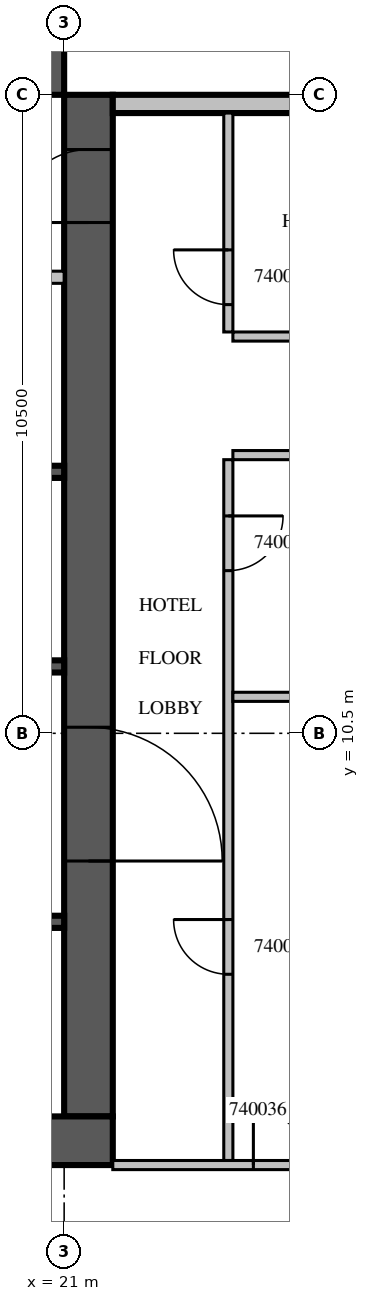
"""IFC4 building model, lengths in metres.
Left out: names, types, materials, properties, quantities, classifications, styles, units other than length and angle.
Written with IfcOpenShell. Run it as: python <this file> out.ifc"""

import sys

from ifc_helpers import new_model, si_unit, direction, frame, frame_2d, origin, place, context, subcontext, project, spatial, rectangle, extrude, source, transform, mapped, element, fill, save


model = new_model("IFC4")
c1 = context("Model", 3, precision=1e-05, world=origin(), true_north=direction((0.0, 1.0)))
c2 = subcontext(c1, "Body", "Model", "MODEL_VIEW")
j1 = project(units=[si_unit("LENGTHUNIT", "METRE"), si_unit("PLANEANGLEUNIT", "RADIAN")], contexts=[c1])
p1 = place(None, origin())
s1 = spatial("IfcSite", under=j1, at=p1, CompositionType="ELEMENT")
p2 = place(p1, origin())
s2 = spatial("IfcBuilding", under=s1, at=p2, CompositionType="ELEMENT")
p3 = place(p2, frame((0.0, 0.0, 185.4)))
s3 = spatial("IfcBuildingStorey", under=s2, at=p3, CompositionType="ELEMENT", Elevation=185.4)
m1 = source(origin(), c2, "Body", "SweptSolid", [
    extrude(rectangle(XDim=16.8, YDim=0.8, at=frame_2d((8.4, 0.0))), origin(), (0.0, 0.0, 1.0), 3.8),
])
p4 = place(p3, frame((21.4, 4.2, 0.0), z_axis=(0.0, 0.0, 1.0), x_axis=(0.0, 1.0, 0.0)))
e1 = element("IfcWall", 1, at=p4, inside=s3, PredefinedType="SHEAR", context=c2, shape_type="MappedRepresentation", body=[
    mapped(m1, transform((0.0, 0.0, 0.0), scale=1.0)),
])
m2 = source(origin(), c2, "Body", "SweptSolid", [
    extrude(rectangle(XDim=2.2, YDim=2.1, at=frame_2d((1.1, 1.05))), frame((0.0, 0.41, 0.0), z_axis=(0.0, -1.0, 0.0), x_axis=(1.0, 0.0, 0.0)), (0.0, 0.0, 1.0), 0.82),
])
p5 = place(p4, frame((4.2, 0.0, 0.0)))
e2 = element("IfcOpeningElement", 2, at=p5, cuts=e1, PredefinedType="OPENING", context=c2, shape_type="MappedRepresentation", body=[
    mapped(m2, transform((0.0, 0.0, 0.0), scale=1.0)),
])
m3 = source(origin(), c2, "Body", "SweptSolid", [
    extrude(rectangle(XDim=1.2, YDim=2.1, at=frame_2d((0.6, 1.05))), frame((0.0, 0.41, 0.0), z_axis=(0.0, -1.0, 0.0), x_axis=(1.0, 0.0, 0.0)), (0.0, 0.0, 1.0), 0.82),
])
p6 = place(p4, frame((14.7, 0.0, 0.0)))
e3 = element("IfcOpeningElement", 3, at=p6, cuts=e1, PredefinedType="OPENING", context=c2, shape_type="MappedRepresentation", body=[
    mapped(m3, transform((0.0, 0.0, 0.0), scale=1.0)),
])
m4 = source(origin(), c2, "Body", "SweptSolid", [
    extrude(rectangle(XDim=17.6, YDim=0.8, at=frame_2d((8.8, 0.0))), origin(), (0.0, 0.0, 1.0), 3.8),
])
p7 = place(p3, frame((4.2, 3.8, 0.0), z_axis=(0.0, 0.0, 1.0), x_axis=(1.0, 0.0, 0.0)))
e4 = element("IfcWall", 4, at=p7, inside=s3, PredefinedType="SHEAR", context=c2, shape_type="MappedRepresentation", body=[
    mapped(m4, transform((0.0, 0.0, 0.0), scale=1.0)),
])
m5 = source(origin(), c2, "Body", "SweptSolid", [
    extrude(rectangle(XDim=0.9, YDim=2.1, at=frame_2d((0.45, 1.05))), frame((0.0, 0.41, 0.0), z_axis=(0.0, -1.0, 0.0), x_axis=(1.0, 0.0, 0.0)), (0.0, 0.0, 1.0), 0.82),
])
p8 = place(p7, frame((11.55, 0.0, 0.0)))
e5 = element("IfcOpeningElement", 5, at=p8, cuts=e4, PredefinedType="OPENING", context=c2, shape_type="MappedRepresentation", body=[
    mapped(m5, transform((0.0, 0.0, 0.0), scale=1.0)),
])
p9 = place(p3, frame((4.2, 21.4, 0.0), z_axis=(0.0, 0.0, 1.0), x_axis=(1.0, 0.0, 0.0)))
e6 = element("IfcWall", 6, at=p9, inside=s3, PredefinedType="SHEAR", context=c2, shape_type="MappedRepresentation", body=[
    mapped(m1, transform((0.0, 0.0, 0.0), scale=1.0)),
])
p10 = place(p9, frame((7.4, 0.0, 0.0)))
e7 = element("IfcOpeningElement", 7, at=p10, cuts=e6, PredefinedType="OPENING", context=c2, shape_type="MappedRepresentation", body=[
    mapped(m3, transform((0.0, 0.0, 0.0), scale=1.0)),
])
m6 = source(origin(), c2, "Body", "SweptSolid", [
    extrude(rectangle(XDim=7.15, YDim=0.3, at=frame_2d((3.575, 0.0))), origin(), (0.0, 0.0, 1.0), 3.4),
])
p11 = place(p3, frame((28.95, 20.85, 0.0), z_axis=(0.0, 0.0, 1.0), x_axis=(-1.0, 0.0, 0.0)))
e8 = element("IfcWall", 8, at=p11, inside=s3, PredefinedType="STANDARD", context=c2, shape_type="MappedRepresentation", body=[
    mapped(m6, transform((0.0, 0.0, 0.0), scale=1.0)),
])
m7 = source(origin(), c2, "Body", "SweptSolid", [
    extrude(rectangle(XDim=3.0, YDim=2.3, at=frame_2d((1.5, 1.15))), frame((0.0, 0.16, 0.0), z_axis=(0.0, -1.0, 0.0), x_axis=(1.0, 0.0, 0.0)), (0.0, 0.0, 1.0), 0.32),
])
p12 = place(p11, frame((0.15, 0.0, 0.6)))
e9 = element("IfcOpeningElement", 9, at=p12, cuts=e8, PredefinedType="OPENING", context=c2, shape_type="MappedRepresentation", body=[
    mapped(m7, transform((0.0, 0.0, 0.0), scale=1.0)),
])
m8 = source(origin(), c2, "Body", "SweptSolid", [
    extrude(rectangle(XDim=2.4, YDim=0.2, at=frame_2d((1.2, 0.0))), origin(), (0.0, 0.0, 1.0), 3.8),
])
p13 = place(p3, frame((18.6, 7.4, 0.0), z_axis=(0.0, 0.0, 1.0), x_axis=(1.0, 0.0, 0.0)))
e10 = element("IfcWall", 10, at=p13, inside=s3, PredefinedType="SOLIDWALL", context=c2, shape_type="MappedRepresentation", body=[
    mapped(m8, transform((0.0, 0.0, 0.0), scale=1.0)),
])
m9 = source(origin(), c2, "Body", "SweptSolid", [
    extrude(rectangle(XDim=9.6, YDim=0.2, at=frame_2d((4.8, 0.0))), origin(), (0.0, 0.0, 1.0), 3.8),
])
p14 = place(p3, frame((11.4, 11.6, 0.0), z_axis=(0.0, 0.0, 1.0), x_axis=(1.0, 0.0, 0.0)))
e11 = element("IfcWall", 11, at=p14, inside=s3, PredefinedType="SOLIDWALL", context=c2, shape_type="MappedRepresentation", body=[
    mapped(m9, transform((0.0, 0.0, 0.0), scale=1.0)),
])
p15 = place(p3, frame((11.4, 14.8, 0.0), z_axis=(0.0, 0.0, 1.0), x_axis=(1.0, 0.0, 0.0)))
e12 = element("IfcWall", 12, at=p15, inside=s3, PredefinedType="SOLIDWALL", context=c2, shape_type="MappedRepresentation", body=[
    mapped(m9, transform((0.0, 0.0, 0.0), scale=1.0)),
])
m10 = source(origin(), c2, "Body", "SweptSolid", [
    extrude(rectangle(XDim=1.1, YDim=2.1, at=frame_2d((0.55, 1.05))), frame((0.0, 0.11, 0.0), z_axis=(0.0, -1.0, 0.0), x_axis=(1.0, 0.0, 0.0)), (0.0, 0.0, 1.0), 0.22),
])
p16 = place(p15, frame((3.05, 0.0, 0.0)))
e13 = element("IfcOpeningElement", 13, at=p16, cuts=e12, PredefinedType="OPENING", context=c2, shape_type="MappedRepresentation", body=[
    mapped(m10, transform((0.0, 0.0, 0.0), scale=1.0)),
])
p17 = place(p15, frame((5.45, 0.0, 0.0)))
e14 = element("IfcOpeningElement", 14, at=p17, cuts=e12, PredefinedType="OPENING", context=c2, shape_type="MappedRepresentation", body=[
    mapped(m10, transform((0.0, 0.0, 0.0), scale=1.0)),
])
p18 = place(p15, frame((7.85, 0.0, 0.0)))
e15 = element("IfcOpeningElement", 15, at=p18, cuts=e12, PredefinedType="OPENING", context=c2, shape_type="MappedRepresentation", body=[
    mapped(m10, transform((0.0, 0.0, 0.0), scale=1.0)),
])
m11 = source(origin(), c2, "Body", "SweptSolid", [
    extrude(rectangle(XDim=11.45, YDim=0.2, at=frame_2d((5.725, 0.0))), origin(), (0.0, 0.0, 1.0), 3.4),
])
p19 = place(p3, frame((9.55, 18.0, 0.0), z_axis=(0.0, 0.0, 1.0), x_axis=(1.0, 0.0, 0.0)))
e16 = element("IfcWall", 16, at=p19, inside=s3, PredefinedType="PARTITIONING", context=c2, shape_type="MappedRepresentation", body=[
    mapped(m11, transform((0.0, 0.0, 0.0), scale=1.0)),
])
m12 = source(origin(), c2, "Body", "SweptSolid", [
    extrude(rectangle(XDim=0.9, YDim=2.1, at=frame_2d((0.45, 1.05))), frame((0.0, 0.11, 0.0), z_axis=(0.0, -1.0, 0.0), x_axis=(1.0, 0.0, 0.0)), (0.0, 0.0, 1.0), 0.22),
])
p20 = place(p19, frame((1.075, 0.0, 0.0)))
e17 = element("IfcOpeningElement", 17, at=p20, cuts=e16, PredefinedType="OPENING", context=c2, shape_type="MappedRepresentation", body=[
    mapped(m12, transform((0.0, 0.0, 0.0), scale=1.0)),
])
p21 = place(p19, frame((3.125, 0.0, 0.0)))
e18 = element("IfcOpeningElement", 18, at=p21, cuts=e16, PredefinedType="OPENING", context=c2, shape_type="MappedRepresentation", body=[
    mapped(m12, transform((0.0, 0.0, 0.0), scale=1.0)),
])
p22 = place(p19, frame((7.35, 0.0, 0.0)))
e19 = element("IfcOpeningElement", 19, at=p22, cuts=e16, PredefinedType="OPENING", context=c2, shape_type="MappedRepresentation", body=[
    mapped(m10, transform((0.0, 0.0, 0.0), scale=1.0)),
])
m13 = source(origin(), c2, "Body", "SweptSolid", [
    extrude(rectangle(XDim=11.525, YDim=0.15, at=frame_2d((5.763, 0.0))), origin(), (0.0, 0.0, 1.0), 3.4),
])
p23 = place(p3, frame((23.7, 15.0, 0.0), z_axis=(0.0, 0.0, 1.0), x_axis=(0.0, -1.0, 0.0)))
e20 = element("IfcWall", 20, at=p23, inside=s3, PredefinedType="PARTITIONING", context=c2, shape_type="MappedRepresentation", body=[
    mapped(m13, transform((0.0, 0.0, 0.0), scale=1.0)),
])
m14 = source(origin(), c2, "Body", "SweptSolid", [
    extrude(rectangle(XDim=0.9, YDim=2.1, at=frame_2d((0.45, 1.05))), frame((0.0, 0.085, 0.0), z_axis=(0.0, -1.0, 0.0), x_axis=(1.0, 0.0, 0.0)), (0.0, 0.0, 1.0), 0.17),
])
p24 = place(p23, frame((7.562, 0.0, 0.0)))
e21 = element("IfcOpeningElement", 21, at=p24, cuts=e20, PredefinedType="OPENING", context=c2, shape_type="MappedRepresentation", body=[
    mapped(m14, transform((0.0, 0.0, 0.0), scale=1.0)),
])
p25 = place(p23, frame((0.925, 0.0, 0.0)))
e22 = element("IfcOpeningElement", 22, at=p25, cuts=e20, PredefinedType="OPENING", context=c2, shape_type="MappedRepresentation", body=[
    mapped(m14, transform((0.0, 0.0, 0.0), scale=1.0)),
])
m15 = source(origin(), c2, "Body", "SweptSolid", [
    extrude(rectangle(XDim=3.6, YDim=0.15, at=frame_2d((1.8, 0.0))), origin(), (0.0, 0.0, 1.0), 3.4),
])
p26 = place(p3, frame((23.7, 20.7, 0.0), z_axis=(0.0, 0.0, 1.0), x_axis=(0.0, -1.0, 0.0)))
e23 = element("IfcWall", 23, at=p26, inside=s3, PredefinedType="PARTITIONING", context=c2, shape_type="MappedRepresentation", body=[
    mapped(m15, transform((0.0, 0.0, 0.0), scale=1.0)),
])
p27 = place(p26, frame((2.25, 0.0, 0.0)))
e24 = element("IfcOpeningElement", 24, at=p27, cuts=e23, PredefinedType="OPENING", context=c2, shape_type="MappedRepresentation", body=[
    mapped(m14, transform((0.0, 0.0, 0.0), scale=1.0)),
])
m16 = source(origin(), c2, "Body", "SweptSolid", [
    extrude(rectangle(XDim=5.55, YDim=0.15, at=frame_2d((2.775, 0.0))), origin(), (0.0, 0.0, 1.0), 3.4),
])
for number, where, z_axis, x_axis in (
    (25, (29.325, 11.1, 0.0), (0.0, 0.0, 1.0), (-1.0, 0.0, 0.0)),
    (26, (29.325, 15.075, 0.0), (0.0, 0.0, 1.0), (-1.0, 0.0, 0.0)),
    (27, (23.775, 17.025, 0.0), (0.0, 0.0, 1.0), (1.0, 0.0, 0.0)),
):
    element("IfcWall", number, at=place(p3, frame(where, z_axis=z_axis, x_axis=x_axis)), inside=s3, PredefinedType="PARTITIONING", context=c2, shape_type="MappedRepresentation", body=[
        mapped(m16, transform((0.0, 0.0, 0.0), scale=1.0)),
    ])
m17 = source(origin(), c2, "Body", "SweptSolid", [
    extrude(rectangle(XDim=7.525, YDim=0.15, at=frame_2d((3.763, 0.0))), origin(), (0.0, 0.0, 1.0), 3.4),
])
p28 = place(p3, frame((21.8, 3.4, 0.0), z_axis=(0.0, 0.0, 1.0), x_axis=(1.0, 0.0, 0.0)))
e28 = element("IfcWall", 28, at=p28, inside=s3, PredefinedType="PARTITIONING", context=c2, shape_type="MappedRepresentation", body=[
    mapped(m17, transform((0.0, 0.0, 0.0), scale=1.0)),
])
m18 = source(origin(), c2, "Body", "SweptSolid", [
    extrude(rectangle(XDim=1.0, YDim=2.1, at=frame_2d((0.5, 1.05))), frame((0.0, 0.085, 0.0), z_axis=(0.0, -1.0, 0.0), x_axis=(1.0, 0.0, 0.0)), (0.0, 0.0, 1.0), 0.17),
])
p29 = place(p28, frame((3.3, 0.0, 0.0)))
e29 = element("IfcOpeningElement", 29, at=p29, cuts=e28, PredefinedType="OPENING", context=c2, shape_type="MappedRepresentation", body=[
    mapped(m18, transform((0.0, 0.0, 0.0), scale=1.0)),
])
p30 = place(p28, frame((2.312, 0.0, 0.0)))
e30 = element("IfcOpeningElement", 30, at=p30, cuts=e28, PredefinedType="OPENING", context=c2, shape_type="MappedRepresentation", body=[
    mapped(m14, transform((0.0, 0.0, 0.0), scale=1.0)),
])
m19 = source(origin(), c2, "Body", "SweptSolid", [
    extrude(rectangle(XDim=2.2, YDim=2.1, at=frame_2d((1.1, 1.05))), frame((0.0, 0.025, 0.0), z_axis=(0.0, -1.0, 0.0), x_axis=(1.0, 0.0, 0.0)), (0.0, 0.0, 1.0), 0.05),
])
p31 = place(p5, origin())
e31 = element("IfcDoor", 31, at=p31, inside=s3, OperationType="DOUBLE_DOOR_SINGLE_SWING", PredefinedType="DOOR", context=c2, shape_type="MappedRepresentation", body=[
    mapped(m19, transform((0.0, 0.0, 0.0), scale=1.0)),
])
fill(e2, e31)
m20 = source(origin(), c2, "Body", "SweptSolid", [
    extrude(rectangle(XDim=1.2, YDim=2.1, at=frame_2d((0.6, 1.05))), frame((0.0, 0.025, 0.0), z_axis=(0.0, -1.0, 0.0), x_axis=(1.0, 0.0, 0.0)), (0.0, 0.0, 1.0), 0.05),
])
p32 = place(p6, origin())
e32 = element("IfcDoor", 32, at=p32, inside=s3, OperationType="SINGLE_SWING_LEFT", PredefinedType="DOOR", context=c2, shape_type="MappedRepresentation", body=[
    mapped(m20, transform((0.0, 0.0, 0.0), scale=1.0)),
])
fill(e3, e32)
m21 = source(origin(), c2, "Body", "SweptSolid", [
    extrude(rectangle(XDim=0.9, YDim=2.1, at=frame_2d((0.45, 1.05))), frame((0.0, 0.025, 0.0), z_axis=(0.0, -1.0, 0.0), x_axis=(1.0, 0.0, 0.0)), (0.0, 0.0, 1.0), 0.05),
])
p33 = place(p24, origin())
e33 = element("IfcDoor", 33, at=p33, inside=s3, OperationType="SINGLE_SWING_RIGHT", PredefinedType="DOOR", context=c2, shape_type="MappedRepresentation", body=[
    mapped(m21, transform((0.0, 0.0, 0.0), scale=1.0)),
])
fill(e21, e33)
p34 = place(p25, origin())
e34 = element("IfcDoor", 34, at=p34, inside=s3, OperationType="SINGLE_SWING_LEFT", PredefinedType="DOOR", context=c2, shape_type="MappedRepresentation", body=[
    mapped(m21, transform((0.0, 0.0, 0.0), scale=1.0)),
])
fill(e22, e34)
p35 = place(p27, origin())
e35 = element("IfcDoor", 35, at=p35, inside=s3, OperationType="SINGLE_SWING_RIGHT", PredefinedType="DOOR", context=c2, shape_type="MappedRepresentation", body=[
    mapped(m21, transform((0.0, 0.0, 0.0), scale=1.0)),
])
fill(e24, e35)
p36 = place(p30, origin())
e36 = element("IfcDoor", 36, at=p36, inside=s3, OperationType="SINGLE_SWING_LEFT", PredefinedType="DOOR", context=c2, shape_type="MappedRepresentation", body=[
    mapped(m21, transform((0.0, 0.0, 0.0), scale=1.0)),
])
fill(e30, e36)
save(model, sys.argv[1])
